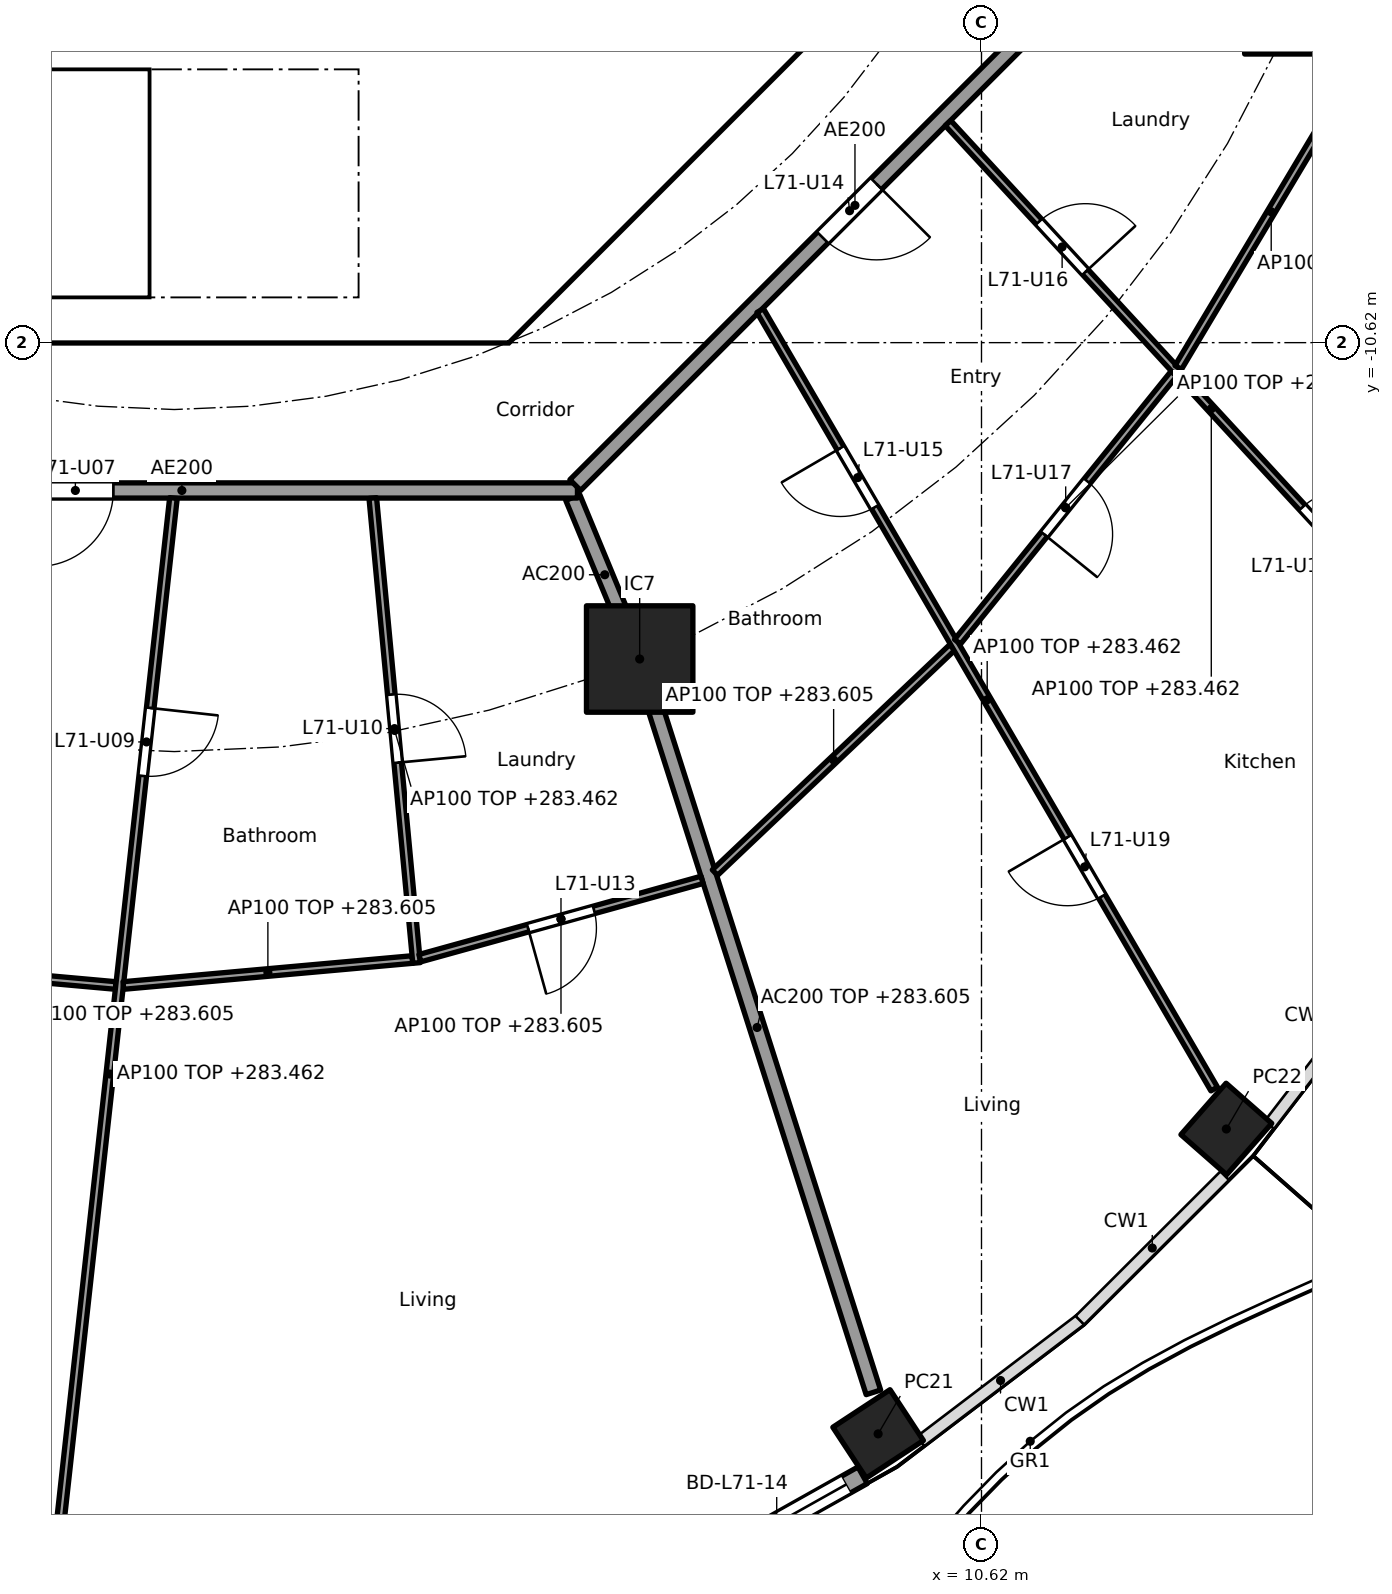
"""IFC4 building model, lengths in metres.
Left out: names, types, materials, properties, quantities, classifications, styles, units other than length and angle.
Written with IfcOpenShell. Run it as: python <this file> out.ifc"""

import sys

from ifc_helpers import new_model, si_unit, direction, frame, frame_2d, origin, origin_2d, place, context, subcontext, project, spatial, polyline, rectangle, hollow_rectangle, outline, extrude, element, fill, save


model = new_model("IFC4")
c1 = context("Model", 3, precision=1e-05, world=origin(), true_north=direction((0.0, 1.0)))
c2 = subcontext(c1, "Body", "Model", "MODEL_VIEW")
j1 = project(units=[si_unit("LENGTHUNIT", "METRE"), si_unit("PLANEANGLEUNIT", "RADIAN")], contexts=[c1])
p1 = place(None, origin())
s1 = spatial("IfcSite", under=j1, at=p1, CompositionType="ELEMENT")
p2 = place(p1, origin())
s2 = spatial("IfcBuilding", under=s1, at=p2, CompositionType="ELEMENT")
p3 = place(p2, frame((0.0, 0.0, 280.7)))
s3 = spatial("IfcBuildingStorey", under=s2, at=p3, CompositionType="ELEMENT", Elevation=280.7)
for number, where, z_axis, x_axis in (
    (1, (9.26, -24.976, 0.0), (0.0, 0.0, 1.0), (0.836, 0.549, 0.0)),
    (2, (13.841, -20.965, 0.0), (0.0, 0.0, 1.0), (0.66, 0.751, 0.0)),
):
    element("IfcColumn", number, at=place(p3, frame(where, z_axis=z_axis, x_axis=x_axis)), inside=s3, PredefinedType="COLUMN", context=c2, shape_type="SweptSolid", body=[
        extrude(hollow_rectangle(XDim=0.9, YDim=0.8, WallThickness=0.028, at=origin_2d()), origin(), (0.0, 0.0, 1.0), 3.7),
    ])
for number, where, z_axis, x_axis in (
    (3, (6.123, -14.782, 0.0), (0.0, 0.0, 1.0), (1.0, 0.0, 0.0)),
    (4, (14.782, -6.123, 0.0), (0.0, 0.0, 1.0), (1.0, 0.0, 0.0)),
):
    element("IfcColumn", number, at=place(p3, frame(where, z_axis=z_axis, x_axis=x_axis)), inside=s3, PredefinedType="COLUMN", context=c2, shape_type="SweptSolid", body=[
        extrude(rectangle(XDim=1.4, YDim=1.4, at=origin_2d()), origin(), (0.0, 0.0, 1.0), 3.7),
    ])
p4 = place(p3, frame((9.056, -25.521, 0.0), z_axis=(0.0, 0.0, 1.0), x_axis=(-0.872093060299, -0.489340059855, 0.0)))
e5 = element("IfcWall", 5, at=p4, inside=s3, PredefinedType="SOLIDWALL", context=c2, shape_type="SweptSolid", body=[
    extrude(rectangle(XDim=2.593, YDim=0.25, at=frame_2d((1.296, 0.0))), origin(), (0.0, 0.0, 1.0), 3.44),
])
p5 = place(p4, frame((0.247, 0.0, 0.0)))
e6 = element("IfcOpeningElement", 6, at=p5, cuts=e5, PredefinedType="OPENING", context=c2, shape_type="SweptSolid", body=[
    extrude(rectangle(XDim=2.1, YDim=2.4, at=frame_2d((1.05, 1.2))), frame((0.0, 0.135, 0.0), z_axis=(0.0, -1.0, 0.0), x_axis=(1.0, 0.0, 0.0)), (0.0, 0.0, 1.0), 0.27),
])
p6 = place(p3, frame((4.613, -9.988, 0.0), z_axis=(0.0, 0.0, 1.0), x_axis=(0.707106781187, 0.707106781187, 0.0)))
e7 = element("IfcWall", 7, at=p6, inside=s3, PredefinedType="SHEAR", context=c2, shape_type="SweptSolid", body=[
    extrude(rectangle(XDim=7.602, YDim=0.6, at=frame_2d((3.801, 0.0))), origin(), (0.0, 0.0, 1.0), 3.44),
])
p7 = place(p6, frame((3.201, 0.0, 0.0)))
e8 = element("IfcOpeningElement", 8, at=p7, cuts=e7, PredefinedType="OPENING", context=c2, shape_type="SweptSolid", body=[
    extrude(rectangle(XDim=1.2, YDim=2.1, at=frame_2d((0.6, 1.05))), frame((0.0, 0.31, 0.0), z_axis=(0.0, -1.0, 0.0), x_axis=(1.0, 0.0, 0.0)), (0.0, 0.0, 1.0), 0.62),
])
p8 = place(p3, frame((4.0, -10.025, 0.0), z_axis=(0.0, 0.0, 1.0), x_axis=(0.0, 1.0, 0.0)))
e9 = element("IfcWall", 9, at=p8, inside=s3, PredefinedType="SOLIDWALL", context=c2, shape_type="SweptSolid", body=[
    extrude(rectangle(XDim=3.0, YDim=0.2, at=frame_2d((1.5, 0.0))), origin(), (0.0, 0.0, 1.0), 3.44),
])
p9 = place(p8, frame((0.975, 0.0, 0.0)))
e10 = element("IfcOpeningElement", 10, at=p9, cuts=e9, PredefinedType="OPENING", context=c2, shape_type="SweptSolid", body=[
    extrude(rectangle(XDim=1.1, YDim=2.1, at=frame_2d((0.55, 1.05))), frame((0.0, 0.11, 0.0), z_axis=(0.0, -1.0, 0.0), x_axis=(1.0, 0.0, 0.0)), (0.0, 0.0, 1.0), 0.22),
])
p10 = place(p3, origin())
e11 = element("IfcWall", 11, at=p10, inside=s3, PredefinedType="SHEAR", context=c2, shape_type="SweptSolid", body=[
    extrude(outline(polyline([(-4.152, -10.025), (4.152, -10.025), (4.401, -9.776), (4.825, -10.2), (4.401, -10.625), (-4.401, -10.625), (-4.825, -10.2), (-4.401, -9.776), (-4.152, -10.025)])), origin(), (0.0, 0.0, 1.0), 3.44),
])
p11 = place(p3, origin())
e12 = element("IfcWall", 12, at=p11, inside=s3, PredefinedType="SOLIDWALL", context=c2, shape_type="SweptSolid", body=[
    extrude(outline(polyline([(4.1, -7.025), (-4.1, -7.025), (-4.1, -6.5), (4.1, -6.5), (4.1, -7.025)])), origin(), (0.0, 0.0, 1.0), 3.44),
])
p12 = place(p3, frame((5.243, -12.657, 0.0), z_axis=(0.0, 0.0, 1.0), x_axis=(0.382707856524, -0.923869415315, 0.0)))
e13 = element("IfcWall", 13, at=p12, inside=s3, PredefinedType="PARTITIONING", context=c2, shape_type="SweptSolid", body=[
    extrude(rectangle(XDim=2.2, YDim=0.2, at=frame_2d((1.1, 0.0))), origin(), (0.0, 0.0, 1.0), 3.44),
])
p13 = place(p3, frame((6.138, -14.83, 0.0), z_axis=(0.0, 0.0, 1.0), x_axis=(0.303653679037, -0.952782474234, 0.0)))
e14 = element("IfcWall", 14, at=p13, inside=s3, PredefinedType="PARTITIONING", context=c2, shape_type="SweptSolid", body=[
    extrude(rectangle(XDim=10.076, YDim=0.2, at=frame_2d((5.038, 0.0))), origin(), (0.0, 0.0, 1.0), 2.905),
])
p14 = place(p3, frame((14.823, -6.151, 0.0), z_axis=(0.0, 0.0, 1.0), x_axis=(0.821435065081, -0.570302054928, 0.0)))
e15 = element("IfcWall", 15, at=p14, inside=s3, PredefinedType="PARTITIONING", context=c2, shape_type="SweptSolid", body=[
    extrude(rectangle(XDim=5.368, YDim=0.2, at=frame_2d((2.684, 0.0))), origin(), (0.0, 0.0, 1.0), 3.44),
])
p15 = place(p3, frame((-5.104, -12.565, 0.0), z_axis=(0.0, 0.0, 1.0), x_axis=(1.0, 0.0, 0.0)))
e16 = element("IfcWall", 16, at=p15, inside=s3, PredefinedType="PARTITIONING", context=c2, shape_type="SweptSolid", body=[
    extrude(rectangle(XDim=10.409, YDim=0.2, at=frame_2d((5.205, 0.0))), origin(), (0.0, 0.0, 1.0), 3.44),
])
p16 = place(p15, frame((3.303, 0.0, 0.0)))
e17 = element("IfcOpeningElement", 17, at=p16, cuts=e16, PredefinedType="OPENING", context=c2, shape_type="SweptSolid", body=[
    extrude(rectangle(XDim=1.0, YDim=2.1, at=frame_2d((0.5, 1.05))), frame((0.0, 0.11, 0.0), z_axis=(0.0, -1.0, 0.0), x_axis=(1.0, 0.0, 0.0)), (0.0, 0.0, 1.0), 0.22),
])
p17 = place(p3, frame((5.275, -12.494, 0.0), z_axis=(0.0, 0.0, 1.0), x_axis=(0.707106781187, 0.707106781187, 0.0)))
e18 = element("IfcWall", 18, at=p17, inside=s3, PredefinedType="PARTITIONING", context=c2, shape_type="SweptSolid", body=[
    extrude(rectangle(XDim=10.409, YDim=0.2, at=frame_2d((5.205, 0.0))), origin(), (0.0, 0.0, 1.0), 3.44),
])
p18 = place(p17, frame((4.604, 0.0, 0.0)))
e19 = element("IfcOpeningElement", 19, at=p18, cuts=e18, PredefinedType="OPENING", context=c2, shape_type="SweptSolid", body=[
    extrude(rectangle(XDim=1.0, YDim=2.1, at=frame_2d((0.5, 1.05))), frame((0.0, 0.11, 0.0), z_axis=(0.0, -1.0, 0.0), x_axis=(1.0, 0.0, 0.0)), (0.0, 0.0, 1.0), 0.22),
])
p19 = place(p3, frame((-4.573, -18.736, 0.0), z_axis=(0.0, 0.0, 1.0), x_axis=(0.995986472869, -0.089503887414, 0.0)))
e20 = element("IfcWall", 20, at=p19, inside=s3, PredefinedType="PARTITIONING", context=c2, shape_type="SweptSolid", body=[
    extrude(rectangle(XDim=3.819, YDim=0.1, at=frame_2d((1.909, 0.0))), origin(), (0.0, 0.0, 1.0), 2.905),
])
p20 = place(p19, frame((1.459, 0.0, 0.0)))
e21 = element("IfcOpeningElement", 21, at=p20, cuts=e20, PredefinedType="OPENING", context=c2, shape_type="SweptSolid", body=[
    extrude(rectangle(XDim=0.9, YDim=2.1, at=frame_2d((0.45, 1.05))), frame((0.0, 0.06, 0.0), z_axis=(0.0, -1.0, 0.0), x_axis=(1.0, 0.0, 0.0)), (0.0, 0.0, 1.0), 0.12),
])
p21 = place(p3, frame((-0.011, -12.664, 0.0), z_axis=(0.0, 0.0, 1.0), x_axis=(-0.109805889692, -0.993953050495, 0.0)))
e22 = element("IfcWall", 22, at=p21, inside=s3, PredefinedType="PARTITIONING", context=c2, shape_type="SweptSolid", body=[
    extrude(rectangle(XDim=15.248, YDim=0.1, at=frame_2d((7.624, 0.0))), origin(), (0.0, 0.0, 1.0), 2.762),
])
p22 = place(p21, frame((2.778, 0.0, 0.0)))
e23 = element("IfcOpeningElement", 23, at=p22, cuts=e22, PredefinedType="OPENING", context=c2, shape_type="SweptSolid", body=[
    extrude(rectangle(XDim=0.9, YDim=2.1, at=frame_2d((0.45, 1.05))), frame((0.0, 0.06, 0.0), z_axis=(0.0, -1.0, 0.0), x_axis=(1.0, 0.0, 0.0)), (0.0, 0.0, 1.0), 0.12),
])
p23 = place(p3, frame((-0.67, -19.077, 0.0), z_axis=(0.0, 0.0, 1.0), x_axis=(0.995986472869, 0.089503887414, 0.0)))
e24 = element("IfcWall", 24, at=p23, inside=s3, PredefinedType="PARTITIONING", context=c2, shape_type="SweptSolid", body=[
    extrude(rectangle(XDim=3.819, YDim=0.1, at=frame_2d((1.909, 0.0))), origin(), (0.0, 0.0, 1.0), 2.905),
])
p24 = place(p3, frame((2.612, -12.664, 0.0), z_axis=(0.0, 0.0, 1.0), x_axis=(0.093781393779, -0.995592813444, 0.0)))
e25 = element("IfcWall", 25, at=p24, inside=s3, PredefinedType="PARTITIONING", context=c2, shape_type="SweptSolid", body=[
    extrude(rectangle(XDim=6.144, YDim=0.1, at=frame_2d((3.072, 0.0))), origin(), (0.0, 0.0, 1.0), 2.762),
])
p25 = place(p24, frame((2.597, 0.0, 0.0)))
e26 = element("IfcOpeningElement", 26, at=p25, cuts=e25, PredefinedType="OPENING", context=c2, shape_type="SweptSolid", body=[
    extrude(rectangle(XDim=0.9, YDim=2.1, at=frame_2d((0.45, 1.05))), frame((0.0, 0.06, 0.0), z_axis=(0.0, -1.0, 0.0), x_axis=(1.0, 0.0, 0.0)), (0.0, 0.0, 1.0), 0.12),
])
p26 = place(p3, frame((3.231, -18.718, 0.0), z_axis=(0.0, 0.0, 1.0), x_axis=(0.963606817151, 0.267323590318, 0.0)))
e27 = element("IfcWall", 27, at=p26, inside=s3, PredefinedType="PARTITIONING", context=c2, shape_type="SweptSolid", body=[
    extrude(rectangle(XDim=3.853, YDim=0.1, at=frame_2d((1.927, 0.0))), origin(), (0.0, 0.0, 1.0), 2.905),
])
p27 = place(p26, frame((1.477, 0.0, 0.0)))
e28 = element("IfcOpeningElement", 28, at=p27, cuts=e27, PredefinedType="OPENING", context=c2, shape_type="SweptSolid", body=[
    extrude(rectangle(XDim=0.9, YDim=2.1, at=frame_2d((0.45, 1.05))), frame((0.0, 0.06, 0.0), z_axis=(0.0, -1.0, 0.0), x_axis=(1.0, 0.0, 0.0)), (0.0, 0.0, 1.0), 0.12),
])
p28 = place(p3, frame((7.113, -17.592, 0.0), z_axis=(0.0, 0.0, 1.0), x_axis=(0.725433932329, 0.688291805723, 0.0)))
e29 = element("IfcWall", 29, at=p28, inside=s3, PredefinedType="PARTITIONING", context=c2, shape_type="SweptSolid", body=[
    extrude(rectangle(XDim=4.305, YDim=0.1, at=frame_2d((2.153, 0.0))), origin(), (0.0, 0.0, 1.0), 2.905),
])
p29 = place(p3, frame((7.708, -10.198, 0.0), z_axis=(0.0, 0.0, 1.0), x_axis=(0.503839015963, -0.863797572347, 0.0)))
e30 = element("IfcWall", 30, at=p29, inside=s3, PredefinedType="PARTITIONING", context=c2, shape_type="SweptSolid", body=[
    extrude(rectangle(XDim=11.856, YDim=0.1, at=frame_2d((5.928, 0.0))), origin(), (0.0, 0.0, 1.0), 2.762),
])
p30 = place(p29, frame((2.095, 0.0, 0.0)))
e31 = element("IfcOpeningElement", 31, at=p30, cuts=e30, PredefinedType="OPENING", context=c2, shape_type="SweptSolid", body=[
    extrude(rectangle(XDim=0.9, YDim=2.1, at=frame_2d((0.45, 1.05))), frame((0.0, 0.06, 0.0), z_axis=(0.0, -1.0, 0.0), x_axis=(1.0, 0.0, 0.0)), (0.0, 0.0, 1.0), 0.12),
])
p31 = place(p29, frame((8.023, 0.0, 0.0)))
e32 = element("IfcOpeningElement", 32, at=p31, cuts=e30, PredefinedType="OPENING", context=c2, shape_type="SweptSolid", body=[
    extrude(rectangle(XDim=0.9, YDim=2.1, at=frame_2d((0.45, 1.05))), frame((0.0, 0.06, 0.0), z_axis=(0.0, -1.0, 0.0), x_axis=(1.0, 0.0, 0.0)), (0.0, 0.0, 1.0), 0.12),
])
p32 = place(p3, frame((10.304, -14.555, 0.0), z_axis=(0.0, 0.0, 1.0), x_axis=(0.628170338674, 0.778075848237, 0.0)))
e33 = element("IfcWall", 33, at=p32, inside=s3, PredefinedType="PARTITIONING", context=c2, shape_type="SweptSolid", body=[
    extrude(rectangle(XDim=4.532, YDim=0.1, at=frame_2d((2.266, 0.0))), origin(), (0.0, 0.0, 1.0), 2.905),
])
p33 = place(p32, frame((1.816, 0.0, 0.0)))
e34 = element("IfcOpeningElement", 34, at=p33, cuts=e33, PredefinedType="OPENING", context=c2, shape_type="SweptSolid", body=[
    extrude(rectangle(XDim=0.9, YDim=2.1, at=frame_2d((0.45, 1.05))), frame((0.0, 0.06, 0.0), z_axis=(0.0, -1.0, 0.0), x_axis=(1.0, 0.0, 0.0)), (0.0, 0.0, 1.0), 0.12),
])
p34 = place(p3, frame((10.179, -7.731, 0.0), z_axis=(0.0, 0.0, 1.0), x_axis=(0.67775318564, -0.73528947997, 0.0)))
e35 = element("IfcWall", 35, at=p34, inside=s3, PredefinedType="PARTITIONING", context=c2, shape_type="SweptSolid", body=[
    extrude(rectangle(XDim=10.222, YDim=0.1, at=frame_2d((5.111, 0.0))), origin(), (0.0, 0.0, 1.0), 2.762),
])
p35 = place(p34, frame((1.766, 0.0, 0.0)))
e36 = element("IfcOpeningElement", 36, at=p35, cuts=e35, PredefinedType="OPENING", context=c2, shape_type="SweptSolid", body=[
    extrude(rectangle(XDim=0.9, YDim=2.1, at=frame_2d((0.45, 1.05))), frame((0.0, 0.06, 0.0), z_axis=(0.0, -1.0, 0.0), x_axis=(1.0, 0.0, 0.0)), (0.0, 0.0, 1.0), 0.12),
])
p36 = place(p34, frame((6.877, 0.0, 0.0)))
e37 = element("IfcOpeningElement", 37, at=p36, cuts=e35, PredefinedType="OPENING", context=c2, shape_type="SweptSolid", body=[
    extrude(rectangle(XDim=0.9, YDim=2.1, at=frame_2d((0.45, 1.05))), frame((0.0, 0.06, 0.0), z_axis=(0.0, -1.0, 0.0), x_axis=(1.0, 0.0, 0.0)), (0.0, 0.0, 1.0), 0.12),
])
p37 = place(p3, frame((13.208, -10.947, 0.0), z_axis=(0.0, 0.0, 1.0), x_axis=(0.512726452516, 0.858552028063, 0.0)))
e38 = element("IfcWall", 38, at=p37, inside=s3, PredefinedType="PARTITIONING", context=c2, shape_type="SweptSolid", body=[
    extrude(rectangle(XDim=4.772, YDim=0.1, at=frame_2d((2.386, 0.0))), origin(), (0.0, 0.0, 1.0), 2.905),
])
p38 = place(p5, origin())
e39 = element("IfcDoor", 39, at=p38, inside=s3, OperationType="SLIDING_TO_LEFT", PredefinedType="DOOR", context=c2, shape_type="SweptSolid", body=[
    extrude(rectangle(XDim=2.1, YDim=2.4, at=frame_2d((1.05, 1.2))), frame((0.0, 0.025, 0.0), z_axis=(0.0, -1.0, 0.0), x_axis=(1.0, 0.0, 0.0)), (0.0, 0.0, 1.0), 0.05),
])
fill(e6, e39)
p39 = place(p9, origin())
e40 = element("IfcDoor", 40, at=p39, inside=s3, OperationType="SINGLE_SWING_LEFT", PredefinedType="DOOR", context=c2, shape_type="SweptSolid", body=[
    extrude(rectangle(XDim=1.1, YDim=2.1, at=frame_2d((0.55, 1.05))), frame((0.0, 0.025, 0.0), z_axis=(0.0, -1.0, 0.0), x_axis=(1.0, 0.0, 0.0)), (0.0, 0.0, 1.0), 0.05),
])
fill(e10, e40)
p40 = place(p7, origin())
e41 = element("IfcDoor", 41, at=p40, inside=s3, OperationType="SINGLE_SWING_RIGHT", PredefinedType="DOOR", context=c2, shape_type="SweptSolid", body=[
    extrude(rectangle(XDim=1.2, YDim=2.1, at=frame_2d((0.6, 1.05))), frame((0.0, 0.025, 0.0), z_axis=(0.0, -1.0, 0.0), x_axis=(1.0, 0.0, 0.0)), (0.0, 0.0, 1.0), 0.05),
])
fill(e8, e41)
p41 = place(p16, frame((1.0, 0.0, 0.0), x_axis=(-1.0, 0.0, 0.0)))
e42 = element("IfcDoor", 42, at=p41, inside=s3, OperationType="SINGLE_SWING_RIGHT", PredefinedType="DOOR", context=c2, shape_type="SweptSolid", body=[
    extrude(rectangle(XDim=1.0, YDim=2.1, at=frame_2d((0.5, 1.05))), frame((0.0, 0.025, 0.0), z_axis=(0.0, -1.0, 0.0), x_axis=(1.0, 0.0, 0.0)), (0.0, 0.0, 1.0), 0.05),
])
fill(e17, e42)
p42 = place(p22, origin())
e43 = element("IfcDoor", 43, at=p42, inside=s3, OperationType="SINGLE_SWING_LEFT", PredefinedType="DOOR", context=c2, shape_type="SweptSolid", body=[
    extrude(rectangle(XDim=0.9, YDim=2.1, at=frame_2d((0.45, 1.05))), frame((0.0, 0.025, 0.0), z_axis=(0.0, -1.0, 0.0), x_axis=(1.0, 0.0, 0.0)), (0.0, 0.0, 1.0), 0.05),
])
fill(e23, e43)
p43 = place(p25, origin())
e44 = element("IfcDoor", 44, at=p43, inside=s3, OperationType="SINGLE_SWING_RIGHT", PredefinedType="DOOR", context=c2, shape_type="SweptSolid", body=[
    extrude(rectangle(XDim=0.9, YDim=2.1, at=frame_2d((0.45, 1.05))), frame((0.0, 0.025, 0.0), z_axis=(0.0, -1.0, 0.0), x_axis=(1.0, 0.0, 0.0)), (0.0, 0.0, 1.0), 0.05),
])
fill(e26, e44)
p44 = place(p27, frame((0.9, 0.0, 0.0), x_axis=(-1.0, 0.0, 0.0)))
e45 = element("IfcDoor", 45, at=p44, inside=s3, OperationType="SINGLE_SWING_RIGHT", PredefinedType="DOOR", context=c2, shape_type="SweptSolid", body=[
    extrude(rectangle(XDim=0.9, YDim=2.1, at=frame_2d((0.45, 1.05))), frame((0.0, 0.025, 0.0), z_axis=(0.0, -1.0, 0.0), x_axis=(1.0, 0.0, 0.0)), (0.0, 0.0, 1.0), 0.05),
])
fill(e28, e45)
p45 = place(p18, frame((1.0, 0.0, 0.0), x_axis=(-1.0, 0.0, 0.0)))
e46 = element("IfcDoor", 46, at=p45, inside=s3, OperationType="SINGLE_SWING_LEFT", PredefinedType="DOOR", context=c2, shape_type="SweptSolid", body=[
    extrude(rectangle(XDim=1.0, YDim=2.1, at=frame_2d((0.5, 1.05))), frame((0.0, 0.025, 0.0), z_axis=(0.0, -1.0, 0.0), x_axis=(1.0, 0.0, 0.0)), (0.0, 0.0, 1.0), 0.05),
])
fill(e19, e46)
p46 = place(p30, frame((0.9, 0.0, 0.0), x_axis=(-1.0, 0.0, 0.0)))
e47 = element("IfcDoor", 47, at=p46, inside=s3, OperationType="SINGLE_SWING_RIGHT", PredefinedType="DOOR", context=c2, shape_type="SweptSolid", body=[
    extrude(rectangle(XDim=0.9, YDim=2.1, at=frame_2d((0.45, 1.05))), frame((0.0, 0.025, 0.0), z_axis=(0.0, -1.0, 0.0), x_axis=(1.0, 0.0, 0.0)), (0.0, 0.0, 1.0), 0.05),
])
fill(e31, e47)
p47 = place(p35, origin())
e48 = element("IfcDoor", 48, at=p47, inside=s3, OperationType="SINGLE_SWING_RIGHT", PredefinedType="DOOR", context=c2, shape_type="SweptSolid", body=[
    extrude(rectangle(XDim=0.9, YDim=2.1, at=frame_2d((0.45, 1.05))), frame((0.0, 0.025, 0.0), z_axis=(0.0, -1.0, 0.0), x_axis=(1.0, 0.0, 0.0)), (0.0, 0.0, 1.0), 0.05),
])
fill(e36, e48)
p48 = place(p33, frame((0.9, 0.0, 0.0), x_axis=(-1.0, 0.0, 0.0)))
e49 = element("IfcDoor", 49, at=p48, inside=s3, OperationType="SINGLE_SWING_RIGHT", PredefinedType="DOOR", context=c2, shape_type="SweptSolid", body=[
    extrude(rectangle(XDim=0.9, YDim=2.1, at=frame_2d((0.45, 1.05))), frame((0.0, 0.025, 0.0), z_axis=(0.0, -1.0, 0.0), x_axis=(1.0, 0.0, 0.0)), (0.0, 0.0, 1.0), 0.05),
])
fill(e34, e49)
p49 = place(p36, origin())
e50 = element("IfcDoor", 50, at=p49, inside=s3, OperationType="SINGLE_SWING_RIGHT", PredefinedType="DOOR", context=c2, shape_type="SweptSolid", body=[
    extrude(rectangle(XDim=0.9, YDim=2.1, at=frame_2d((0.45, 1.05))), frame((0.0, 0.025, 0.0), z_axis=(0.0, -1.0, 0.0), x_axis=(1.0, 0.0, 0.0)), (0.0, 0.0, 1.0), 0.05),
])
fill(e37, e50)
p50 = place(p31, frame((0.9, 0.0, 0.0), x_axis=(-1.0, 0.0, 0.0)))
e51 = element("IfcDoor", 51, at=p50, inside=s3, OperationType="SINGLE_SWING_RIGHT", PredefinedType="DOOR", context=c2, shape_type="SweptSolid", body=[
    extrude(rectangle(XDim=0.9, YDim=2.1, at=frame_2d((0.45, 1.05))), frame((0.0, 0.025, 0.0), z_axis=(0.0, -1.0, 0.0), x_axis=(1.0, 0.0, 0.0)), (0.0, 0.0, 1.0), 0.05),
])
fill(e32, e51)
save(model, sys.argv[1])
